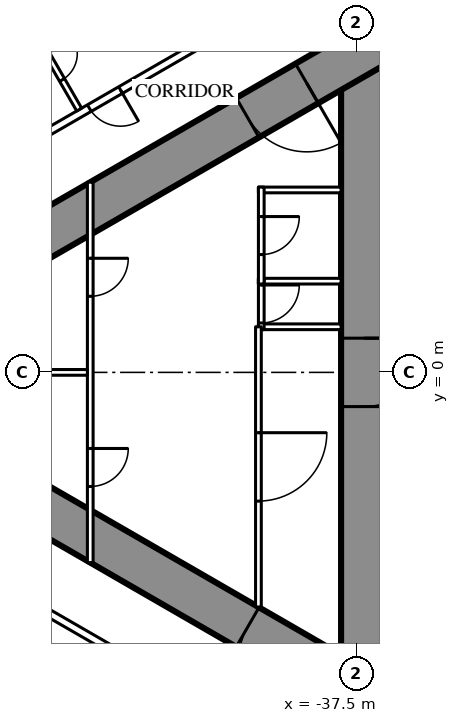
"""IFC4 building model, lengths in metres.
Left out: names, types, materials, properties, quantities, classifications, styles, units other than length and angle.
Written with IfcOpenShell. Run it as: python <this file> out.ifc"""

import sys

from ifc_helpers import new_model, si_unit, direction, frame, frame_2d, origin, place, context, subcontext, project, spatial, rectangle, extrude, element, fill, save


model = new_model("IFC4")
c1 = context("Model", 3, precision=1e-05, world=origin(), true_north=direction((0.0, 1.0)))
c2 = subcontext(c1, "Body", "Model", "MODEL_VIEW")
j1 = project(units=[si_unit("LENGTHUNIT", "METRE"), si_unit("PLANEANGLEUNIT", "RADIAN")], contexts=[c1])
p1 = place(None, origin())
s1 = spatial("IfcSite", under=j1, at=p1, CompositionType="ELEMENT")
p2 = place(p1, origin())
s2 = spatial("IfcBuilding", under=s1, at=p2, CompositionType="ELEMENT")
p3 = place(p2, frame((0.0, 0.0, 122.1)))
s3 = spatial("IfcBuildingStorey", under=s2, at=p3, CompositionType="ELEMENT", Elevation=122.1)
p4 = place(p3, frame((-37.3, 8.6, 0.0), z_axis=(0.0, 0.0, 1.0), x_axis=(0.0, -1.0, 0.0)))
e1 = element("IfcWall", 1, at=p4, inside=s3, PredefinedType="SHEAR", context=c2, shape_type="SweptSolid", body=[
    extrude(rectangle(XDim=17.2, YDim=1.2, at=frame_2d((8.6, 0.0))), origin(), (0.0, 0.0, 1.0), 3.5),
])
p5 = place(p4, frame((7.7, 0.0, 0.0)))
e2 = element("IfcOpeningElement", 2, at=p5, cuts=e1, PredefinedType="OPENING", context=c2, shape_type="SweptSolid", body=[
    extrude(rectangle(XDim=1.8, YDim=2.2, at=frame_2d((0.9, 1.1))), frame((0.0, 0.61, 0.0), z_axis=(0.0, -1.0, 0.0), x_axis=(1.0, 0.0, 0.0)), (0.0, 0.0, 1.0), 1.22),
])
p6 = place(p3, frame((-27.2, 14.3, 0.0), z_axis=(0.0, 0.0, 1.0), x_axis=(-0.866026593062, -0.499997940104, 0.0)))
e3 = element("IfcWall", 3, at=p6, inside=s3, PredefinedType="SHEAR", context=c2, shape_type="SweptSolid", body=[
    extrude(rectangle(XDim=28.946, YDim=1.2, at=frame_2d((14.473, 0.0))), origin(), (0.0, 0.0, 1.0), 3.5),
])
p7 = place(p6, frame((4.6, 0.0, 0.0)))
e4 = element("IfcOpeningElement", 4, at=p7, cuts=e3, PredefinedType="OPENING", context=c2, shape_type="SweptSolid", body=[
    extrude(rectangle(XDim=1.0, YDim=2.2, at=frame_2d((0.5, 1.1))), frame((0.0, 0.61, 0.0), z_axis=(0.0, -1.0, 0.0), x_axis=(1.0, 0.0, 0.0)), (0.0, 0.0, 1.0), 1.22),
])
p8 = place(p6, frame((13.395, 0.0, 0.0)))
e5 = element("IfcOpeningElement", 5, at=p8, cuts=e3, PredefinedType="OPENING", context=c2, shape_type="SweptSolid", body=[
    extrude(rectangle(XDim=1.8, YDim=2.2, at=frame_2d((0.9, 1.1))), frame((0.0, 0.61, 0.0), z_axis=(0.0, -1.0, 0.0), x_axis=(1.0, 0.0, 0.0)), (0.0, 0.0, 1.0), 1.22),
])
p9 = place(p3, frame((-27.2, -14.3, 0.0), z_axis=(0.0, 0.0, 1.0), x_axis=(-0.866024021859, 0.500002393557, 0.0)))
e6 = element("IfcWall", 6, at=p9, inside=s3, PredefinedType="SHEAR", context=c2, shape_type="SweptSolid", body=[
    extrude(rectangle(XDim=27.907, YDim=1.2, at=frame_2d((13.954, 0.0))), origin(), (0.0, 0.0, 1.0), 3.5),
])
p10 = place(p9, frame((4.6, 0.0, 0.0)))
e7 = element("IfcOpeningElement", 7, at=p10, cuts=e6, PredefinedType="OPENING", context=c2, shape_type="SweptSolid", body=[
    extrude(rectangle(XDim=1.0, YDim=2.2, at=frame_2d((0.5, 1.1))), frame((0.0, 0.61, 0.0), z_axis=(0.0, -1.0, 0.0), x_axis=(1.0, 0.0, 0.0)), (0.0, 0.0, 1.0), 1.22),
])
p11 = place(p9, frame((13.395, 0.0, 0.0)))
e8 = element("IfcOpeningElement", 8, at=p11, cuts=e6, PredefinedType="OPENING", context=c2, shape_type="SweptSolid", body=[
    extrude(rectangle(XDim=1.8, YDim=2.2, at=frame_2d((0.9, 1.1))), frame((0.0, 0.61, 0.0), z_axis=(0.0, -1.0, 0.0), x_axis=(1.0, 0.0, 0.0)), (0.0, 0.0, 1.0), 1.22),
])
p12 = place(p3, frame((-36.92, -11.344, 0.0), z_axis=(0.0, 0.0, 1.0), x_axis=(-0.866028313256, 0.499994960614, 0.0)))
e9 = element("IfcWall", 9, at=p12, inside=s3, PredefinedType="PARTITIONING", context=c2, shape_type="SweptSolid", body=[
    extrude(rectangle(XDim=22.568, YDim=0.2, at=frame_2d((11.284, 0.0))), origin(), (0.0, 0.0, 1.0), 3.25),
])
p13 = place(p12, frame((12.131, 0.0, 0.0)))
e10 = element("IfcOpeningElement", 10, at=p13, cuts=e9, PredefinedType="OPENING", context=c2, shape_type="SweptSolid", body=[
    extrude(rectangle(XDim=0.95, YDim=2.2, at=frame_2d((0.475, 1.1))), frame((0.0, 0.11, 0.0), z_axis=(0.0, -1.0, 0.0), x_axis=(1.0, 0.0, 0.0)), (0.0, 0.0, 1.0), 0.22),
])
p14 = place(p12, frame((3.35, 0.0, 0.0)))
e11 = element("IfcOpeningElement", 11, at=p14, cuts=e9, PredefinedType="OPENING", context=c2, shape_type="SweptSolid", body=[
    extrude(rectangle(XDim=1.0, YDim=2.2, at=frame_2d((0.5, 1.1))), frame((0.0, 0.11, 0.0), z_axis=(0.0, -1.0, 0.0), x_axis=(1.0, 0.0, 0.0)), (0.0, 0.0, 1.0), 0.22),
])
p15 = place(p3, frame((-37.7, 10.894, 0.0), z_axis=(0.0, 0.0, 1.0), x_axis=(-0.866027551079, -0.499996280759, 0.0)))
e12 = element("IfcWall", 12, at=p15, inside=s3, PredefinedType="PARTITIONING", context=c2, shape_type="SweptSolid", body=[
    extrude(rectangle(XDim=10.831, YDim=0.2, at=frame_2d((5.415, 0.0))), origin(), (0.0, 0.0, 1.0), 3.25),
])
p16 = place(p15, frame((6.93, 0.0, 0.0)))
e13 = element("IfcOpeningElement", 13, at=p16, cuts=e12, PredefinedType="OPENING", context=c2, shape_type="SweptSolid", body=[
    extrude(rectangle(XDim=0.95, YDim=2.2, at=frame_2d((0.475, 1.1))), frame((0.0, 0.11, 0.0), z_axis=(0.0, -1.0, 0.0), x_axis=(1.0, 0.0, 0.0)), (0.0, 0.0, 1.0), 0.22),
])
p17 = place(p3, frame((-44.791, 6.915, 0.0), z_axis=(0.0, 0.0, 1.0), x_axis=(-0.500047596559, 0.865997922154, 0.0)))
e14 = element("IfcWall", 14, at=p17, inside=s3, PredefinedType="PARTITIONING", context=c2, shape_type="SweptSolid", body=[
    extrude(rectangle(XDim=2.6, YDim=0.15, at=frame_2d((1.3, 0.0))), origin(), (0.0, 0.0, 1.0), 3.25),
])
p18 = place(p17, frame((0.9, 0.0, 0.0)))
e15 = element("IfcOpeningElement", 15, at=p18, cuts=e14, PredefinedType="OPENING", context=c2, shape_type="SweptSolid", body=[
    extrude(rectangle(XDim=0.8, YDim=2.2, at=frame_2d((0.4, 1.1))), frame((0.0, 0.085, 0.0), z_axis=(0.0, -1.0, 0.0), x_axis=(1.0, 0.0, 0.0)), (0.0, 0.0, 1.0), 0.17),
])
for number, where, z_axis, x_axis in (
    (16, (-37.9, 1.2, 0.0), (0.0, 0.0, 1.0), (-1.0, 0.0, 0.0)),
    (17, (-37.9, 2.4, 0.0), (0.0, 0.0, 1.0), (-1.0, 0.0, 0.0)),
    (18, (-37.9, 4.8, 0.0), (0.0, 0.0, 1.0), (-1.0, 0.0, 0.0)),
):
    element("IfcWall", number, at=place(p3, frame(where, z_axis=z_axis, x_axis=x_axis)), inside=s3, PredefinedType="PARTITIONING", context=c2, shape_type="SweptSolid", body=[
        extrude(rectangle(XDim=2.175, YDim=0.15, at=frame_2d((1.087, 0.0))), origin(), (0.0, 0.0, 1.0), 3.25),
    ])
p19 = place(p3, frame((-40.0, 2.475, 0.0), z_axis=(0.0, 0.0, 1.0), x_axis=(0.0, -1.0, 0.0)))
e19 = element("IfcWall", 19, at=p19, inside=s3, PredefinedType="PARTITIONING", context=c2, shape_type="SweptSolid", body=[
    extrude(rectangle(XDim=1.35, YDim=0.15, at=frame_2d((0.675, 0.0))), origin(), (0.0, 0.0, 1.0), 3.25),
])
p20 = place(p19, frame((0.175, 0.0, 0.0)))
e20 = element("IfcOpeningElement", 20, at=p20, cuts=e19, PredefinedType="OPENING", context=c2, shape_type="SweptSolid", body=[
    extrude(rectangle(XDim=1.0, YDim=2.2, at=frame_2d((0.5, 1.1))), frame((0.0, 0.085, 0.0), z_axis=(0.0, -1.0, 0.0), x_axis=(1.0, 0.0, 0.0)), (0.0, 0.0, 1.0), 0.17),
])
p21 = place(p3, frame((-40.0, 4.875, 0.0), z_axis=(0.0, 0.0, 1.0), x_axis=(0.0, -1.0, 0.0)))
e21 = element("IfcWall", 21, at=p21, inside=s3, PredefinedType="PARTITIONING", context=c2, shape_type="SweptSolid", body=[
    extrude(rectangle(XDim=2.55, YDim=0.15, at=frame_2d((1.275, 0.0))), origin(), (0.0, 0.0, 1.0), 3.25),
])
p22 = place(p21, frame((0.775, 0.0, 0.0)))
e22 = element("IfcOpeningElement", 22, at=p22, cuts=e21, PredefinedType="OPENING", context=c2, shape_type="SweptSolid", body=[
    extrude(rectangle(XDim=1.0, YDim=2.2, at=frame_2d((0.5, 1.1))), frame((0.0, 0.085, 0.0), z_axis=(0.0, -1.0, 0.0), x_axis=(1.0, 0.0, 0.0)), (0.0, 0.0, 1.0), 0.17),
])
p23 = place(p3, frame((-40.075, 1.2, 0.0), z_axis=(0.0, 0.0, 1.0), x_axis=(0.0, -1.0, 0.0)))
e23 = element("IfcWall", 23, at=p23, inside=s3, PredefinedType="PARTITIONING", context=c2, shape_type="SweptSolid", body=[
    extrude(rectangle(XDim=7.374, YDim=0.15, at=frame_2d((3.687, 0.0))), origin(), (0.0, 0.0, 1.0), 3.25),
])
p24 = place(p23, frame((2.787, 0.0, 0.0)))
e24 = element("IfcOpeningElement", 24, at=p24, cuts=e23, PredefinedType="OPENING", context=c2, shape_type="SweptSolid", body=[
    extrude(rectangle(XDim=1.8, YDim=2.2, at=frame_2d((0.9, 1.1))), frame((0.0, 0.085, 0.0), z_axis=(0.0, -1.0, 0.0), x_axis=(1.0, 0.0, 0.0)), (0.0, 0.0, 1.0), 0.17),
])
p25 = place(p3, frame((-44.5, 5.005, 0.0), z_axis=(0.0, 0.0, 1.0), x_axis=(0.0, -1.0, 0.0)))
e25 = element("IfcWall", 25, at=p25, inside=s3, PredefinedType="PARTITIONING", context=c2, shape_type="SweptSolid", body=[
    extrude(rectangle(XDim=10.009, YDim=0.15, at=frame_2d((5.005, 0.0))), origin(), (0.0, 0.0, 1.0), 2.45),
])
p26 = place(p25, frame((2.002, 0.0, 0.0)))
e26 = element("IfcOpeningElement", 26, at=p26, cuts=e25, PredefinedType="OPENING", context=c2, shape_type="SweptSolid", body=[
    extrude(rectangle(XDim=1.0, YDim=2.2, at=frame_2d((0.5, 1.1))), frame((0.0, 0.085, 0.0), z_axis=(0.0, -1.0, 0.0), x_axis=(1.0, 0.0, 0.0)), (0.0, 0.0, 1.0), 0.17),
])
p27 = place(p25, frame((7.007, 0.0, 0.0)))
e27 = element("IfcOpeningElement", 27, at=p27, cuts=e25, PredefinedType="OPENING", context=c2, shape_type="SweptSolid", body=[
    extrude(rectangle(XDim=1.0, YDim=2.2, at=frame_2d((0.5, 1.1))), frame((0.0, 0.085, 0.0), z_axis=(0.0, -1.0, 0.0), x_axis=(1.0, 0.0, 0.0)), (0.0, 0.0, 1.0), 0.17),
])
p28 = place(p3, frame((-44.575, 0.0, 0.0), z_axis=(0.0, 0.0, 1.0), x_axis=(-1.0, 0.0, 0.0)))
e28 = element("IfcWall", 28, at=p28, inside=s3, PredefinedType="PARTITIONING", context=c2, shape_type="SweptSolid", body=[
    extrude(rectangle(XDim=8.593, YDim=0.15, at=frame_2d((4.297, 0.0))), origin(), (0.0, 0.0, 1.0), 2.2),
])
p29 = place(p18, origin())
e29 = element("IfcDoor", 29, at=p29, inside=s3, OperationType="SINGLE_SWING_RIGHT", PredefinedType="DOOR", context=c2, shape_type="SweptSolid", body=[
    extrude(rectangle(XDim=0.8, YDim=2.2, at=frame_2d((0.4, 1.1))), frame((0.0, 0.025, 0.0), z_axis=(0.0, -1.0, 0.0), x_axis=(1.0, 0.0, 0.0)), (0.0, 0.0, 1.0), 0.05),
])
fill(e15, e29)
p30 = place(p16, origin())
e30 = element("IfcDoor", 30, at=p30, inside=s3, OperationType="SINGLE_SWING_LEFT", PredefinedType="DOOR", context=c2, shape_type="SweptSolid", body=[
    extrude(rectangle(XDim=0.95, YDim=2.2, at=frame_2d((0.475, 1.1))), frame((0.0, 0.025, 0.0), z_axis=(0.0, -1.0, 0.0), x_axis=(1.0, 0.0, 0.0)), (0.0, 0.0, 1.0), 0.05),
])
fill(e13, e30)
p31 = place(p20, origin())
e31 = element("IfcDoor", 31, at=p31, inside=s3, OperationType="SINGLE_SWING_LEFT", PredefinedType="DOOR", context=c2, shape_type="SweptSolid", body=[
    extrude(rectangle(XDim=1.0, YDim=2.2, at=frame_2d((0.5, 1.1))), frame((0.0, 0.025, 0.0), z_axis=(0.0, -1.0, 0.0), x_axis=(1.0, 0.0, 0.0)), (0.0, 0.0, 1.0), 0.05),
])
fill(e20, e31)
p32 = place(p22, origin())
e32 = element("IfcDoor", 32, at=p32, inside=s3, OperationType="SINGLE_SWING_LEFT", PredefinedType="DOOR", context=c2, shape_type="SweptSolid", body=[
    extrude(rectangle(XDim=1.0, YDim=2.2, at=frame_2d((0.5, 1.1))), frame((0.0, 0.025, 0.0), z_axis=(0.0, -1.0, 0.0), x_axis=(1.0, 0.0, 0.0)), (0.0, 0.0, 1.0), 0.05),
])
fill(e22, e32)
p33 = place(p24, origin())
e33 = element("IfcDoor", 33, at=p33, inside=s3, OperationType="DOUBLE_DOOR_SINGLE_SWING", PredefinedType="DOOR", context=c2, shape_type="SweptSolid", body=[
    extrude(rectangle(XDim=1.8, YDim=2.2, at=frame_2d((0.9, 1.1))), frame((0.0, 0.025, 0.0), z_axis=(0.0, -1.0, 0.0), x_axis=(1.0, 0.0, 0.0)), (0.0, 0.0, 1.0), 0.05),
])
fill(e24, e33)
p34 = place(p26, origin())
e34 = element("IfcDoor", 34, at=p34, inside=s3, OperationType="SINGLE_SWING_LEFT", PredefinedType="DOOR", context=c2, shape_type="SweptSolid", body=[
    extrude(rectangle(XDim=1.0, YDim=2.2, at=frame_2d((0.5, 1.1))), frame((0.0, 0.025, 0.0), z_axis=(0.0, -1.0, 0.0), x_axis=(1.0, 0.0, 0.0)), (0.0, 0.0, 1.0), 0.05),
])
fill(e26, e34)
p35 = place(p27, origin())
e35 = element("IfcDoor", 35, at=p35, inside=s3, OperationType="SINGLE_SWING_LEFT", PredefinedType="DOOR", context=c2, shape_type="SweptSolid", body=[
    extrude(rectangle(XDim=1.0, YDim=2.2, at=frame_2d((0.5, 1.1))), frame((0.0, 0.025, 0.0), z_axis=(0.0, -1.0, 0.0), x_axis=(1.0, 0.0, 0.0)), (0.0, 0.0, 1.0), 0.05),
])
fill(e27, e35)
p36 = place(p8, origin())
e36 = element("IfcDoor", 36, at=p36, inside=s3, OperationType="DOUBLE_DOOR_SINGLE_SWING", PredefinedType="DOOR", context=c2, shape_type="SweptSolid", body=[
    extrude(rectangle(XDim=1.8, YDim=2.2, at=frame_2d((0.9, 1.1))), frame((0.0, 0.025, 0.0), z_axis=(0.0, -1.0, 0.0), x_axis=(1.0, 0.0, 0.0)), (0.0, 0.0, 1.0), 0.05),
])
fill(e5, e36)
p37 = place(p11, origin())
e37 = element("IfcDoor", 37, at=p37, inside=s3, OperationType="DOUBLE_DOOR_SINGLE_SWING", PredefinedType="DOOR", context=c2, shape_type="SweptSolid", body=[
    extrude(rectangle(XDim=1.8, YDim=2.2, at=frame_2d((0.9, 1.1))), frame((0.0, 0.025, 0.0), z_axis=(0.0, -1.0, 0.0), x_axis=(1.0, 0.0, 0.0)), (0.0, 0.0, 1.0), 0.05),
])
fill(e8, e37)
p38 = place(p5, origin())
e38 = element("IfcDoor", 38, at=p38, inside=s3, OperationType="DOUBLE_DOOR_SINGLE_SWING", PredefinedType="DOOR", context=c2, shape_type="SweptSolid", body=[
    extrude(rectangle(XDim=1.8, YDim=2.2, at=frame_2d((0.9, 1.1))), frame((0.0, 0.025, 0.0), z_axis=(0.0, -1.0, 0.0), x_axis=(1.0, 0.0, 0.0)), (0.0, 0.0, 1.0), 0.05),
])
fill(e2, e38)
save(model, sys.argv[1])
